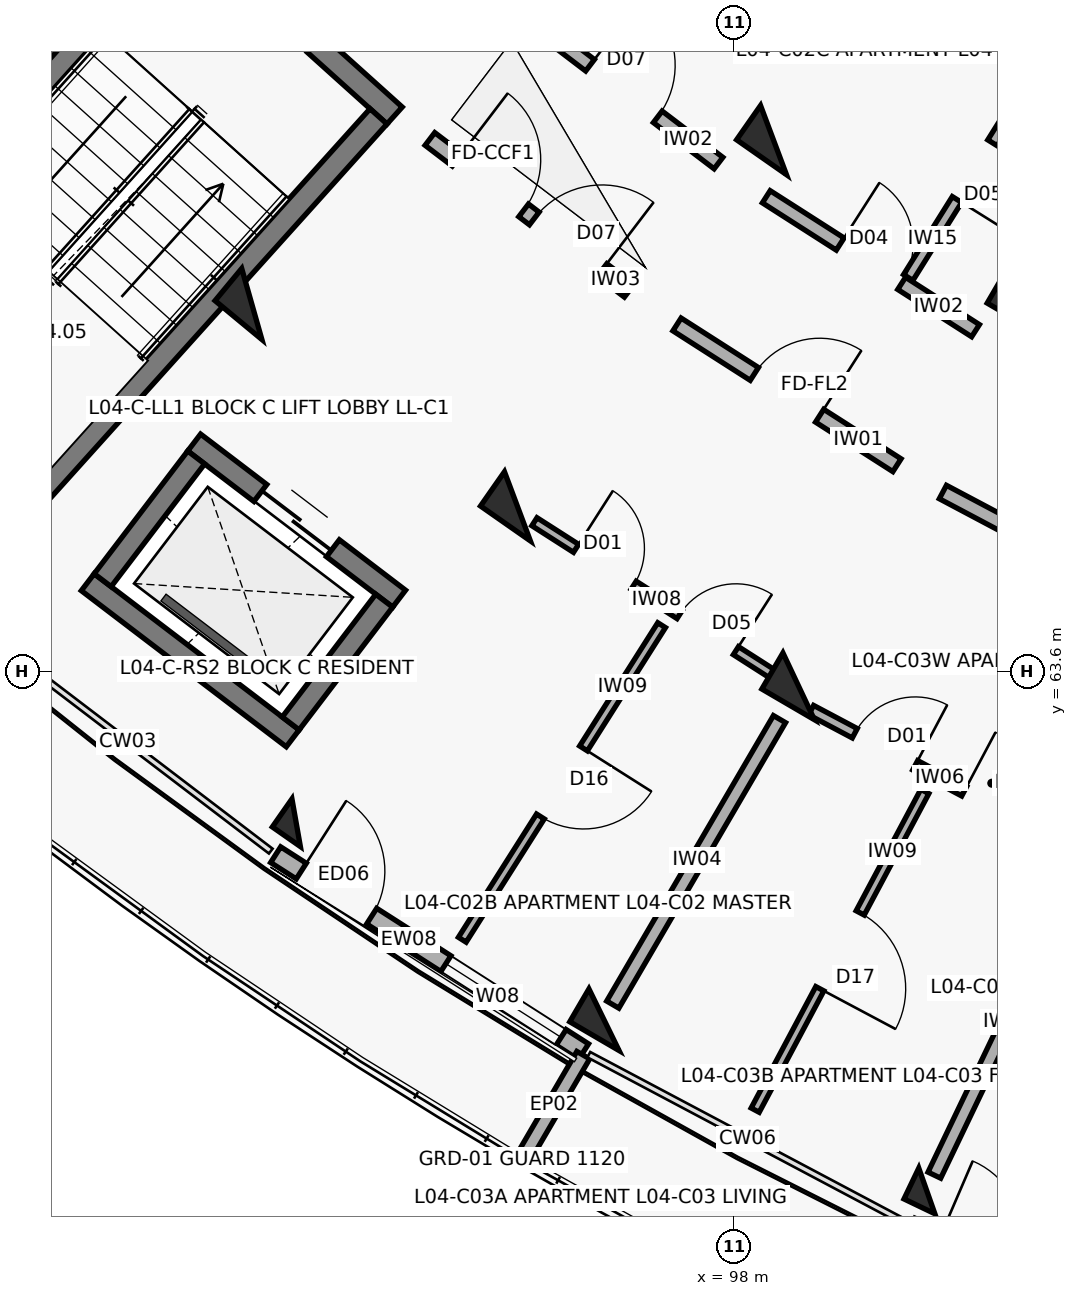
"""IFC4 building model, lengths in metres.
Left out: names, types, materials, properties, quantities, classifications, styles, units other than length and angle.
Written with IfcOpenShell. Run it as: python <this file> out.ifc"""

import sys

from ifc_helpers import new_model, si_unit, direction, frame, frame_2d, origin, origin_2d, place, context, subcontext, project, spatial, rectangle, extrude, element, fill, save


model = new_model("IFC4")
c1 = context("Model", 3, precision=1e-05, world=origin(), true_north=direction((0.0, 1.0)))
c2 = subcontext(c1, "Body", "Model", "MODEL_VIEW")
j1 = project(units=[si_unit("LENGTHUNIT", "METRE"), si_unit("PLANEANGLEUNIT", "RADIAN")], contexts=[c1])
p1 = place(None, origin())
s1 = spatial("IfcSite", under=j1, at=p1, CompositionType="ELEMENT")
p2 = place(p1, origin())
s2 = spatial("IfcBuilding", under=s1, at=p2, CompositionType="ELEMENT")
p3 = place(p2, frame((0.0, 0.0, 14.3)))
s3 = spatial("IfcBuildingStorey", under=s2, at=p3, CompositionType="ELEMENT", Elevation=14.3)
for number, where, z_axis, x_axis in (
    (1, (91.658, 68.43, 0.0), (0.0, 0.0, 1.0), (-0.638, -0.77, 0.0)),
    (2, (98.522, 70.587, 0.0), (0.0, 0.0, 1.0), (-0.573, -0.82, 0.0)),
    (3, (95.152, 65.768, 0.0), (0.0, 0.0, 1.0), (-0.573, -0.82, 0.0)),
):
    element("IfcColumn", number, at=place(p3, frame(where, z_axis=z_axis, x_axis=x_axis)), inside=s3, PredefinedType="COLUMN", context=c2, shape_type="SweptSolid", body=[
        extrude(rectangle(XDim=0.55, YDim=0.8, at=origin_2d()), origin(), (0.0, 0.0, 1.0), 3.1),
    ])
p4 = place(p3, frame((92.241, 61.605, 0.0), z_axis=(0.0, 0.0, 1.0), x_axis=(-0.573004420611, -0.819552276527, 0.0)))
e4 = element("IfcColumn", 4, at=p4, inside=s3, PredefinedType="COLUMN", context=c2, shape_type="SweptSolid", body=[
    extrude(rectangle(XDim=0.45, YDim=0.45, at=origin_2d()), origin(), (0.0, 0.0, 1.0), 3.1),
])
for number, where, z_axis, x_axis in (
    (5, (101.817, 68.478, 0.0), (0.0, 0.0, 1.0), (-0.504, -0.864, 0.0)),
    (6, (98.853, 63.4, 0.0), (0.0, 0.0, 1.0), (-0.504, -0.864, 0.0)),
):
    element("IfcColumn", number, at=place(p3, frame(where, z_axis=z_axis, x_axis=x_axis)), inside=s3, PredefinedType="COLUMN", context=c2, shape_type="SweptSolid", body=[
        extrude(rectangle(XDim=0.55, YDim=0.8, at=origin_2d()), origin(), (0.0, 0.0, 1.0), 3.1),
    ])
p5 = place(p3, frame((96.291, 59.013, 0.0), z_axis=(0.0, 0.0, 1.0), x_axis=(-0.504226211181, -0.863571611366, 0.0)))
e7 = element("IfcColumn", 7, at=p5, inside=s3, PredefinedType="COLUMN", context=c2, shape_type="SweptSolid", body=[
    extrude(rectangle(XDim=0.5, YDim=0.75, at=origin_2d()), origin(), (0.0, 0.0, 1.0), 3.1),
])
p6 = place(p3, frame((100.539, 56.76, 0.0), z_axis=(0.0, 0.0, 1.0), x_axis=(-0.432085748802, -0.901832526405, 0.0)))
e8 = element("IfcColumn", 8, at=p6, inside=s3, PredefinedType="COLUMN", context=c2, shape_type="SweptSolid", body=[
    extrude(rectangle(XDim=0.45, YDim=0.45, at=origin_2d()), origin(), (0.0, 0.0, 1.0), 3.1),
])
p7 = place(p3, frame((91.972, 61.184, 0.0), z_axis=(0.0, 0.0, 1.0), x_axis=(0.84226218024, -0.539068103061, 0.0)))
e9 = element("IfcWall", 9, at=p7, inside=s3, PredefinedType="SOLIDWALL", context=c2, shape_type="SweptSolid", body=[
    extrude(rectangle(XDim=4.809, YDim=0.245, at=frame_2d((2.404, 0.0))), origin(), (0.0, 0.0, 1.0), 2.25),
])
p8 = place(p7, frame((0.4, 0.0, 0.0)))
e10 = element("IfcOpeningElement", 10, at=p8, cuts=e9, PredefinedType="OPENING", context=c2, shape_type="SweptSolid", body=[
    extrude(rectangle(XDim=1.1, YDim=2.15, at=frame_2d((0.55, 1.075))), frame((0.0, 0.133, 0.0), z_axis=(0.0, -1.0, 0.0), x_axis=(1.0, 0.0, 0.0)), (0.0, 0.0, 1.0), 0.265),
])
p9 = place(p7, frame((2.659, 0.0, 0.35)))
e11 = element("IfcOpeningElement", 11, at=p9, cuts=e9, PredefinedType="OPENING", context=c2, shape_type="SweptSolid", body=[
    extrude(rectangle(XDim=1.8, YDim=1.65, at=frame_2d((0.9, 0.825))), frame((0.0, 0.133, 0.0), z_axis=(0.0, -1.0, 0.0), x_axis=(1.0, 0.0, 0.0)), (0.0, 0.0, 1.0), 0.265),
])
p10 = place(p3, frame((96.019, 58.547, 0.0), z_axis=(0.0, 0.0, 1.0), x_axis=(-0.504228145431, -0.863570481985, 0.0)))
e12 = element("IfcWall", 12, at=p10, inside=s3, PredefinedType="PARAPET", context=c2, shape_type="SweptSolid", body=[
    extrude(rectangle(XDim=1.53, YDim=0.195, at=frame_2d((0.765, 0.0))), origin(), (0.0, 0.0, 1.0), 2.25),
])
p11 = place(p3, frame((90.66, 73.499, 0.0), z_axis=(0.0, 0.0, 1.0), x_axis=(0.743375696158, -0.668874109501, 0.0)))
e13 = element("IfcWall", 13, at=p11, inside=s3, PredefinedType="SHEAR", context=c2, shape_type="SweptSolid", body=[
    extrude(rectangle(XDim=3.87, YDim=0.3, at=frame_2d((1.935, 0.0))), origin(), (0.0, 0.0, 1.0), 3.1),
])
p12 = place(p11, frame((1.41, 0.0, 0.0)))
e14 = element("IfcOpeningElement", 14, at=p12, cuts=e13, PredefinedType="OPENING", context=c2, shape_type="SweptSolid", body=[
    extrude(rectangle(XDim=1.05, YDim=2.15, at=frame_2d((0.525, 1.075))), frame((0.0, 0.16, 0.0), z_axis=(0.0, -1.0, 0.0), x_axis=(1.0, 0.0, 0.0)), (0.0, 0.0, 1.0), 0.32),
])
p13 = place(p3, frame((90.671, 73.287, 0.0), z_axis=(0.0, 0.0, 1.0), x_axis=(-0.668885797871, -0.743365179038, 0.0)))
e15 = element("IfcWall", 15, at=p13, inside=s3, PredefinedType="SHEAR", context=c2, shape_type="SweptSolid", body=[
    extrude(rectangle(XDim=7.69, YDim=0.3, at=frame_2d((3.845, 0.0))), origin(), (0.0, 0.0, 1.0), 3.1),
])
p14 = place(p3, frame((93.325, 70.899, 0.0), z_axis=(0.0, 0.0, 1.0), x_axis=(-0.668868253964, -0.743380964808, 0.0)))
e16 = element("IfcWall", 16, at=p14, inside=s3, PredefinedType="SHEAR", context=c2, shape_type="SweptSolid", body=[
    extrude(rectangle(XDim=7.69, YDim=0.3, at=frame_2d((3.845, 0.0))), origin(), (0.0, 0.0, 1.0), 3.1),
])
p15 = place(p3, frame((90.899, 66.607, 0.0), z_axis=(0.0, 0.0, 1.0), x_axis=(0.795439986025, -0.606032365994, 0.0)))
e17 = element("IfcWall", 17, at=p15, inside=s3, PredefinedType="SHEAR", context=c2, shape_type="SweptSolid", body=[
    extrude(rectangle(XDim=3.39, YDim=0.28, at=frame_2d((1.695, 0.0))), origin(), (0.0, 0.0, 1.0), 3.1),
])
p16 = place(p15, frame((1.095, 0.0, 0.0)))
e18 = element("IfcOpeningElement", 18, at=p16, cuts=e17, PredefinedType="OPENING", context=c2, shape_type="SweptSolid", body=[
    extrude(rectangle(XDim=1.2, YDim=2.15, at=frame_2d((0.6, 1.075))), frame((0.0, 0.15, 0.0), z_axis=(0.0, -1.0, 0.0), x_axis=(1.0, 0.0, 0.0)), (0.0, 0.0, 1.0), 0.3),
])
p17 = place(p3, frame((89.5, 64.77, 0.0), z_axis=(0.0, 0.0, 1.0), x_axis=(0.795474703455, -0.605986795371, 0.0)))
e19 = element("IfcWall", 19, at=p17, inside=s3, PredefinedType="SHEAR", context=c2, shape_type="SweptSolid", body=[
    extrude(rectangle(XDim=3.39, YDim=0.28, at=frame_2d((1.695, 0.0))), origin(), (0.0, 0.0, 1.0), 3.1),
])
p18 = place(p3, frame((90.926, 66.411, 0.0), z_axis=(0.0, 0.0, 1.0), x_axis=(-0.605948992168, -0.795503500238, 0.0)))
e20 = element("IfcWall", 20, at=p18, inside=s3, PredefinedType="SHEAR", context=c2, shape_type="SweptSolid", body=[
    extrude(rectangle(XDim=2.03, YDim=0.28, at=frame_2d((1.015, 0.0))), origin(), (0.0, 0.0, 1.0), 3.1),
])
p19 = place(p3, frame((93.4, 64.526, 0.0), z_axis=(0.0, 0.0, 1.0), x_axis=(-0.605891019062, -0.795547656033, 0.0)))
e21 = element("IfcWall", 21, at=p19, inside=s3, PredefinedType="SHEAR", context=c2, shape_type="SweptSolid", body=[
    extrude(rectangle(XDim=2.03, YDim=0.28, at=frame_2d((1.015, 0.0))), origin(), (0.0, 0.0, 1.0), 3.1),
])
p20 = place(p3, frame((94.001, 70.602, 0.0), z_axis=(0.0, 0.0, 1.0), x_axis=(0.795498026433, -0.605956178235, 0.0)))
e22 = element("IfcWall", 22, at=p20, inside=s3, PredefinedType="SOLIDWALL", context=c2, shape_type="SweptSolid", body=[
    extrude(rectangle(XDim=3.296, YDim=0.21, at=frame_2d((1.648, 0.0))), origin(), (0.0, 0.0, 1.0), 2.08),
])
p21 = place(p20, frame((0.45, 0.0, 0.0)))
e23 = element("IfcOpeningElement", 23, at=p21, cuts=e22, PredefinedType="OPENING", context=c2, shape_type="SweptSolid", body=[
    extrude(rectangle(XDim=1.1, YDim=2.15, at=frame_2d((0.55, 1.075))), frame((0.0, 0.115, 0.0), z_axis=(0.0, -1.0, 0.0), x_axis=(1.0, 0.0, 0.0)), (0.0, 0.0, 1.0), 0.23),
])
p22 = place(p20, frame((1.726, 0.0, 0.0)))
e24 = element("IfcOpeningElement", 24, at=p22, cuts=e22, PredefinedType="OPENING", context=c2, shape_type="SweptSolid", body=[
    extrude(rectangle(XDim=1.12, YDim=2.15, at=frame_2d((0.56, 1.075))), frame((0.0, 0.115, 0.0), z_axis=(0.0, -1.0, 0.0), x_axis=(1.0, 0.0, 0.0)), (0.0, 0.0, 1.0), 0.23),
])
p23 = place(p3, frame((95.309, 72.18, 0.0), z_axis=(0.0, 0.0, 1.0), x_axis=(0.795463961918, -0.606000895453, 0.0)))
e25 = element("IfcWall", 25, at=p23, inside=s3, PredefinedType="SOLIDWALL", context=c2, shape_type="SweptSolid", body=[
    extrude(rectangle(XDim=3.129, YDim=0.19, at=frame_2d((1.564, 0.0))), origin(), (0.0, 0.0, 1.0), 2.08),
])
p24 = place(p23, frame((1.004, 0.0, 0.0)))
e26 = element("IfcOpeningElement", 26, at=p24, cuts=e25, PredefinedType="OPENING", context=c2, shape_type="SweptSolid", body=[
    extrude(rectangle(XDim=1.12, YDim=2.15, at=frame_2d((0.56, 1.075))), frame((0.0, 0.105, 0.0), z_axis=(0.0, -1.0, 0.0), x_axis=(1.0, 0.0, 0.0)), (0.0, 0.0, 1.0), 0.21),
])
p25 = place(p3, frame((97.252, 68.161, 0.0), z_axis=(0.0, 0.0, 1.0), x_axis=(0.842289466461, -0.53902546757, 0.0)))
e27 = element("IfcWall", 27, at=p25, inside=s3, PredefinedType="SOLIDWALL", context=c2, shape_type="SweptSolid", body=[
    extrude(rectangle(XDim=3.436, YDim=0.2, at=frame_2d((1.718, 0.0))), origin(), (0.0, 0.0, 1.0), 2.08),
])
p26 = place(p25, frame((1.208, 0.0, 0.0)))
e28 = element("IfcOpeningElement", 28, at=p26, cuts=e27, PredefinedType="OPENING", context=c2, shape_type="SweptSolid", body=[
    extrude(rectangle(XDim=1.02, YDim=2.15, at=frame_2d((0.51, 1.075))), frame((0.0, 0.11, 0.0), z_axis=(0.0, -1.0, 0.0), x_axis=(1.0, 0.0, 0.0)), (0.0, 0.0, 1.0), 0.22),
])
p27 = place(p3, frame((98.427, 69.841, 0.0), z_axis=(0.0, 0.0, 1.0), x_axis=(0.842280895761, -0.539038860043, 0.0)))
e29 = element("IfcWall", 29, at=p27, inside=s3, PredefinedType="SOLIDWALL", context=c2, shape_type="SweptSolid", body=[
    extrude(rectangle(XDim=3.269, YDim=0.19, at=frame_2d((1.634, 0.0))), origin(), (0.0, 0.0, 1.0), 2.08),
])
p28 = place(p27, frame((1.154, 0.0, 0.0)))
e30 = element("IfcOpeningElement", 30, at=p28, cuts=e29, PredefinedType="OPENING", context=c2, shape_type="SweptSolid", body=[
    extrude(rectangle(XDim=0.96, YDim=2.1, at=frame_2d((0.48, 1.05))), frame((0.0, 0.105, 0.0), z_axis=(0.0, -1.0, 0.0), x_axis=(1.0, 0.0, 0.0)), (0.0, 0.0, 1.0), 0.21),
])
p29 = place(p3, frame((102.044, 71.577, 0.0), z_axis=(0.0, 0.0, 1.0), x_axis=(-0.53015188203, -0.847902696057, 0.0)))
e31 = element("IfcWall", 31, at=p29, inside=s3, PredefinedType="PARTITIONING", context=c2, shape_type="SweptSolid", body=[
    extrude(rectangle(XDim=3.3, YDim=0.145, at=frame_2d((1.65, 0.0))), origin(), (0.0, 0.0, 1.0), 2.08),
])
p30 = place(p29, frame((1.21, 0.0, 0.0)))
e32 = element("IfcOpeningElement", 32, at=p30, cuts=e31, PredefinedType="OPENING", context=c2, shape_type="SweptSolid", body=[
    extrude(rectangle(XDim=0.88, YDim=2.1, at=frame_2d((0.44, 1.05))), frame((0.0, 0.083, 0.0), z_axis=(0.0, -1.0, 0.0), x_axis=(1.0, 0.0, 0.0)), (0.0, 0.0, 1.0), 0.165),
])
p31 = place(p3, frame((95.376, 65.565, 0.0), z_axis=(0.0, 0.0, 1.0), x_axis=(0.842242208372, -0.539099306656, 0.0)))
e33 = element("IfcWall", 33, at=p31, inside=s3, PredefinedType="PARTITIONING", context=c2, shape_type="SweptSolid", body=[
    extrude(rectangle(XDim=3.797, YDim=0.125, at=frame_2d((1.899, 0.0))), origin(), (0.0, 0.0, 1.0), 2.08),
])
p32 = place(p31, frame((0.65, 0.0, 0.0)))
e34 = element("IfcOpeningElement", 34, at=p32, cuts=e33, PredefinedType="OPENING", context=c2, shape_type="SweptSolid", body=[
    extrude(rectangle(XDim=0.9, YDim=2.1, at=frame_2d((0.45, 1.05))), frame((0.0, 0.073, 0.0), z_axis=(0.0, -1.0, 0.0), x_axis=(1.0, 0.0, 0.0)), (0.0, 0.0, 1.0), 0.145),
])
p33 = place(p31, frame((2.267, 0.0, 0.0)))
e35 = element("IfcOpeningElement", 35, at=p33, cuts=e33, PredefinedType="OPENING", context=c2, shape_type="SweptSolid", body=[
    extrude(rectangle(XDim=0.88, YDim=2.1, at=frame_2d((0.44, 1.05))), frame((0.0, 0.073, 0.0), z_axis=(0.0, -1.0, 0.0), x_axis=(1.0, 0.0, 0.0)), (0.0, 0.0, 1.0), 0.145),
])
p34 = place(p3, frame((97.05, 64.204, 0.0), z_axis=(0.0, 0.0, 1.0), x_axis=(-0.535246458955, -0.844695938297, 0.0)))
e36 = element("IfcWall", 36, at=p34, inside=s3, PredefinedType="PARTITIONING", context=c2, shape_type="SweptSolid", body=[
    extrude(rectangle(XDim=4.9, YDim=0.12, at=frame_2d((2.45, 0.0))), origin(), (0.0, 0.0, 1.0), 2.08),
])
p35 = place(p34, frame((1.92, 0.0, 0.0)))
e37 = element("IfcOpeningElement", 37, at=p35, cuts=e36, PredefinedType="OPENING", context=c2, shape_type="SweptSolid", body=[
    extrude(rectangle(XDim=1.06, YDim=2.1, at=frame_2d((0.53, 1.05))), frame((0.0, 0.07, 0.0), z_axis=(0.0, -1.0, 0.0), x_axis=(1.0, 0.0, 0.0)), (0.0, 0.0, 1.0), 0.14),
])
p36 = place(p3, frame((100.75, 65.956, 0.0), z_axis=(0.0, 0.0, 1.0), x_axis=(0.883440266101, -0.468543803963, 0.0)))
e38 = element("IfcWall", 38, at=p36, inside=s3, PredefinedType="SOLIDWALL", context=c2, shape_type="SweptSolid", body=[
    extrude(rectangle(XDim=3.436, YDim=0.2, at=frame_2d((1.718, 0.0))), origin(), (0.0, 0.0, 1.0), 2.08),
])
p37 = place(p36, frame((1.228, 0.0, 0.0)))
e39 = element("IfcOpeningElement", 39, at=p37, cuts=e38, PredefinedType="OPENING", context=c2, shape_type="SweptSolid", body=[
    extrude(rectangle(XDim=0.98, YDim=2.15, at=frame_2d((0.49, 1.075))), frame((0.0, 0.11, 0.0), z_axis=(0.0, -1.0, 0.0), x_axis=(1.0, 0.0, 0.0)), (0.0, 0.0, 1.0), 0.22),
])
p38 = place(p3, frame((99.017, 63.087, 0.0), z_axis=(0.0, 0.0, 1.0), x_axis=(0.883415075746, -0.468591297342, 0.0)))
e40 = element("IfcWall", 40, at=p38, inside=s3, PredefinedType="PARTITIONING", context=c2, shape_type="SweptSolid", body=[
    extrude(rectangle(XDim=3.81, YDim=0.14, at=frame_2d((1.905, 0.0))), origin(), (0.0, 0.0, 1.0), 2.08),
])
p39 = place(p38, frame((0.65, 0.0, 0.0)))
e41 = element("IfcOpeningElement", 41, at=p39, cuts=e40, PredefinedType="OPENING", context=c2, shape_type="SweptSolid", body=[
    extrude(rectangle(XDim=0.9, YDim=2.1, at=frame_2d((0.45, 1.05))), frame((0.0, 0.08, 0.0), z_axis=(0.0, -1.0, 0.0), x_axis=(1.0, 0.0, 0.0)), (0.0, 0.0, 1.0), 0.16),
])
p40 = place(p38, frame((2.28, 0.0, 0.0)))
e42 = element("IfcOpeningElement", 42, at=p40, cuts=e40, PredefinedType="OPENING", context=c2, shape_type="SweptSolid", body=[
    extrude(rectangle(XDim=0.88, YDim=2.1, at=frame_2d((0.44, 1.05))), frame((0.0, 0.08, 0.0), z_axis=(0.0, -1.0, 0.0), x_axis=(1.0, 0.0, 0.0)), (0.0, 0.0, 1.0), 0.16),
])
p41 = place(p3, frame((100.513, 62.016, 0.0), z_axis=(0.0, 0.0, 1.0), x_axis=(-0.469889133168, -0.882725440061, 0.0)))
e43 = element("IfcWall", 43, at=p41, inside=s3, PredefinedType="PARTITIONING", context=c2, shape_type="SweptSolid", body=[
    extrude(rectangle(XDim=4.75, YDim=0.12, at=frame_2d((2.375, 0.0))), origin(), (0.0, 0.0, 1.0), 2.08),
])
p42 = place(p41, frame((1.81, 0.0, 0.0)))
e44 = element("IfcOpeningElement", 44, at=p42, cuts=e43, PredefinedType="OPENING", context=c2, shape_type="SweptSolid", body=[
    extrude(rectangle(XDim=1.13, YDim=2.1, at=frame_2d((0.565, 1.05))), frame((0.0, 0.07, 0.0), z_axis=(0.0, -1.0, 0.0), x_axis=(1.0, 0.0, 0.0)), (0.0, 0.0, 1.0), 0.14),
])
p43 = place(p3, frame((98.601, 62.968, 0.0), z_axis=(0.0, 0.0, 1.0), x_axis=(-0.504216452091, -0.863577309475, 0.0)))
e45 = element("IfcWall", 45, at=p43, inside=s3, PredefinedType="SOLIDWALL", context=c2, shape_type="SweptSolid", body=[
    extrude(rectangle(XDim=4.35, YDim=0.185, at=frame_2d((2.175, 0.0))), origin(), (0.0, 0.0, 1.0), 2.08),
])
p44 = place(p3, frame((102.518, 60.89, 0.0), z_axis=(0.0, 0.0, 1.0), x_axis=(-0.432108769108, -0.901821496561, 0.0)))
e46 = element("IfcWall", 46, at=p44, inside=s3, PredefinedType="SOLIDWALL", context=c2, shape_type="SweptSolid", body=[
    extrude(rectangle(XDim=4.35, YDim=0.185, at=frame_2d((2.175, 0.0))), origin(), (0.0, 0.0, 1.0), 2.08),
])
p45 = place(p8, origin())
e47 = element("IfcDoor", 47, at=p45, inside=s3, OperationType="SINGLE_SWING_LEFT", PredefinedType="DOOR", context=c2, shape_type="SweptSolid", body=[
    extrude(rectangle(XDim=1.1, YDim=2.15, at=frame_2d((0.55, 1.075))), frame((0.0, 0.025, 0.0), z_axis=(0.0, -1.0, 0.0), x_axis=(1.0, 0.0, 0.0)), (0.0, 0.0, 1.0), 0.05),
])
fill(e10, e47)
p46 = place(p9, origin())
e48 = element("IfcWindow", 48, at=p46, inside=s3, PartitioningType="TRIPLE_PANEL_VERTICAL", PredefinedType="WINDOW", context=c2, shape_type="SweptSolid", body=[
    extrude(rectangle(XDim=1.8, YDim=1.65, at=frame_2d((0.9, 0.825))), frame((0.0, 0.03, 0.0), z_axis=(0.0, -1.0, 0.0), x_axis=(1.0, 0.0, 0.0)), (0.0, 0.0, 1.0), 0.06),
])
fill(e11, e48)
p47 = place(p16, origin())
e49 = element("IfcDoor", 49, at=p47, inside=s3, OperationType="DOUBLE_DOOR_SLIDING", PredefinedType="DOOR", context=c2, shape_type="SweptSolid", body=[
    extrude(rectangle(XDim=1.2, YDim=2.15, at=frame_2d((0.6, 1.075))), frame((0.0, 0.025, 0.0), z_axis=(0.0, -1.0, 0.0), x_axis=(1.0, 0.0, 0.0)), (0.0, 0.0, 1.0), 0.05),
])
fill(e18, e49)
p48 = place(p21, origin())
e50 = element("IfcDoor", 50, at=p48, inside=s3, OperationType="SINGLE_SWING_LEFT", PredefinedType="DOOR", context=c2, shape_type="SweptSolid", body=[
    extrude(rectangle(XDim=1.1, YDim=2.15, at=frame_2d((0.55, 1.075))), frame((0.0, 0.025, 0.0), z_axis=(0.0, -1.0, 0.0), x_axis=(1.0, 0.0, 0.0)), (0.0, 0.0, 1.0), 0.05),
])
fill(e23, e50)
p49 = place(p22, origin())
e51 = element("IfcDoor", 51, at=p49, inside=s3, OperationType="SINGLE_SWING_RIGHT", PredefinedType="DOOR", context=c2, shape_type="SweptSolid", body=[
    extrude(rectangle(XDim=1.12, YDim=2.15, at=frame_2d((0.56, 1.075))), frame((0.0, 0.025, 0.0), z_axis=(0.0, -1.0, 0.0), x_axis=(1.0, 0.0, 0.0)), (0.0, 0.0, 1.0), 0.05),
])
fill(e24, e51)
p50 = place(p24, origin())
e52 = element("IfcDoor", 52, at=p50, inside=s3, OperationType="SINGLE_SWING_LEFT", PredefinedType="DOOR", context=c2, shape_type="SweptSolid", body=[
    extrude(rectangle(XDim=1.12, YDim=2.15, at=frame_2d((0.56, 1.075))), frame((0.0, 0.025, 0.0), z_axis=(0.0, -1.0, 0.0), x_axis=(1.0, 0.0, 0.0)), (0.0, 0.0, 1.0), 0.05),
])
fill(e26, e52)
p51 = place(p26, origin())
e53 = element("IfcDoor", 53, at=p51, inside=s3, OperationType="SINGLE_SWING_RIGHT", PredefinedType="DOOR", context=c2, shape_type="SweptSolid", body=[
    extrude(rectangle(XDim=1.02, YDim=2.15, at=frame_2d((0.51, 1.075))), frame((0.0, 0.025, 0.0), z_axis=(0.0, -1.0, 0.0), x_axis=(1.0, 0.0, 0.0)), (0.0, 0.0, 1.0), 0.05),
])
fill(e28, e53)
p52 = place(p28, origin())
e54 = element("IfcDoor", 54, at=p52, inside=s3, OperationType="SINGLE_SWING_LEFT", PredefinedType="DOOR", context=c2, shape_type="SweptSolid", body=[
    extrude(rectangle(XDim=0.96, YDim=2.1, at=frame_2d((0.48, 1.05))), frame((0.0, 0.025, 0.0), z_axis=(0.0, -1.0, 0.0), x_axis=(1.0, 0.0, 0.0)), (0.0, 0.0, 1.0), 0.05),
])
fill(e30, e54)
p53 = place(p30, origin())
e55 = element("IfcDoor", 55, at=p53, inside=s3, OperationType="SINGLE_SWING_RIGHT", PredefinedType="DOOR", context=c2, shape_type="SweptSolid", body=[
    extrude(rectangle(XDim=0.88, YDim=2.1, at=frame_2d((0.44, 1.05))), frame((0.0, 0.025, 0.0), z_axis=(0.0, -1.0, 0.0), x_axis=(1.0, 0.0, 0.0)), (0.0, 0.0, 1.0), 0.05),
])
fill(e32, e55)
p54 = place(p32, origin())
e56 = element("IfcDoor", 56, at=p54, inside=s3, OperationType="SINGLE_SWING_LEFT", PredefinedType="DOOR", context=c2, shape_type="SweptSolid", body=[
    extrude(rectangle(XDim=0.9, YDim=2.1, at=frame_2d((0.45, 1.05))), frame((0.0, 0.025, 0.0), z_axis=(0.0, -1.0, 0.0), x_axis=(1.0, 0.0, 0.0)), (0.0, 0.0, 1.0), 0.05),
])
fill(e34, e56)
p55 = place(p33, origin())
e57 = element("IfcDoor", 57, at=p55, inside=s3, OperationType="SINGLE_SWING_RIGHT", PredefinedType="DOOR", context=c2, shape_type="SweptSolid", body=[
    extrude(rectangle(XDim=0.88, YDim=2.1, at=frame_2d((0.44, 1.05))), frame((0.0, 0.025, 0.0), z_axis=(0.0, -1.0, 0.0), x_axis=(1.0, 0.0, 0.0)), (0.0, 0.0, 1.0), 0.05),
])
fill(e35, e57)
p56 = place(p35, origin())
e58 = element("IfcDoor", 58, at=p56, inside=s3, OperationType="SINGLE_SWING_LEFT", PredefinedType="DOOR", context=c2, shape_type="SweptSolid", body=[
    extrude(rectangle(XDim=1.06, YDim=2.1, at=frame_2d((0.53, 1.05))), frame((0.0, 0.025, 0.0), z_axis=(0.0, -1.0, 0.0), x_axis=(1.0, 0.0, 0.0)), (0.0, 0.0, 1.0), 0.05),
])
fill(e37, e58)
p57 = place(p39, origin())
e59 = element("IfcDoor", 59, at=p57, inside=s3, OperationType="SINGLE_SWING_RIGHT", PredefinedType="DOOR", context=c2, shape_type="SweptSolid", body=[
    extrude(rectangle(XDim=0.9, YDim=2.1, at=frame_2d((0.45, 1.05))), frame((0.0, 0.025, 0.0), z_axis=(0.0, -1.0, 0.0), x_axis=(1.0, 0.0, 0.0)), (0.0, 0.0, 1.0), 0.05),
])
fill(e41, e59)
p58 = place(p40, origin())
e60 = element("IfcDoor", 60, at=p58, inside=s3, OperationType="SINGLE_SWING_LEFT", PredefinedType="DOOR", context=c2, shape_type="SweptSolid", body=[
    extrude(rectangle(XDim=0.88, YDim=2.1, at=frame_2d((0.44, 1.05))), frame((0.0, 0.025, 0.0), z_axis=(0.0, -1.0, 0.0), x_axis=(1.0, 0.0, 0.0)), (0.0, 0.0, 1.0), 0.05),
])
fill(e42, e60)
p59 = place(p42, origin())
e61 = element("IfcDoor", 61, at=p59, inside=s3, OperationType="SINGLE_SWING_RIGHT", PredefinedType="DOOR", context=c2, shape_type="SweptSolid", body=[
    extrude(rectangle(XDim=1.13, YDim=2.1, at=frame_2d((0.565, 1.05))), frame((0.0, 0.025, 0.0), z_axis=(0.0, -1.0, 0.0), x_axis=(1.0, 0.0, 0.0)), (0.0, 0.0, 1.0), 0.05),
])
fill(e44, e61)
save(model, sys.argv[1])
